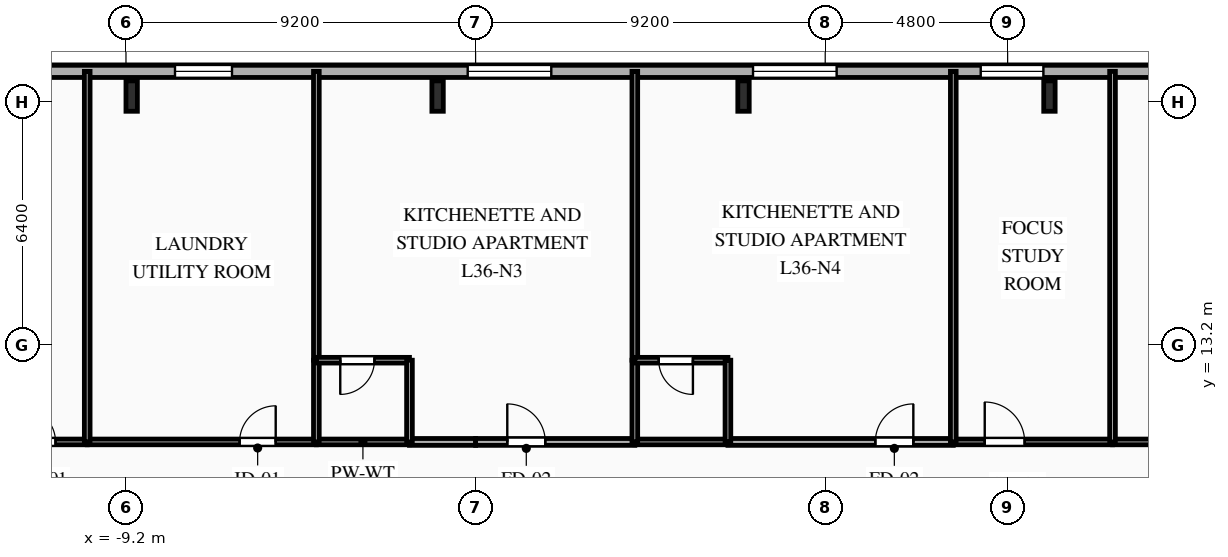
"""IFC4 building model, lengths in metres.
Left out: names, types, materials, properties, quantities, classifications, styles, units other than length and angle.
Written with IfcOpenShell. Run it as: python <this file> out.ifc"""

import sys

from ifc_helpers import new_model, si_unit, direction, frame, frame_2d, origin, origin_2d, place, context, subcontext, project, spatial, rectangle, i_section, extrude, element, fill, save


model = new_model("IFC4")
c1 = context("Model", 3, precision=1e-05, world=origin(), true_north=direction((0.0, 1.0)))
c2 = subcontext(c1, "Body", "Model", "MODEL_VIEW")
j1 = project(units=[si_unit("LENGTHUNIT", "METRE"), si_unit("PLANEANGLEUNIT", "RADIAN")], contexts=[c1])
p1 = place(None, origin())
s1 = spatial("IfcSite", under=j1, at=p1, CompositionType="ELEMENT")
p2 = place(p1, origin())
s2 = spatial("IfcBuilding", under=s1, at=p2, CompositionType="ELEMENT")
p3 = place(p2, frame((0.0, 0.0, 131.0)))
s3 = spatial("IfcBuildingStorey", under=s2, at=p3, CompositionType="ELEMENT", Elevation=131.0)
for number, where, z_axis, x_axis in (
    (1, (15.1, 19.75, 0.0), (0.0, 0.0, 1.0), (1.0, 0.0, 0.0)),
    (2, (7.05, 19.75, 0.0), (0.0, 0.0, 1.0), (1.0, 0.0, 0.0)),
    (3, (-1.0, 19.75, 0.0), (0.0, 0.0, 1.0), (1.0, 0.0, 0.0)),
    (4, (-9.05, 19.75, 0.0), (0.0, 0.0, 1.0), (1.0, 0.0, 0.0)),
):
    element("IfcColumn", number, at=place(p3, frame(where, z_axis=z_axis, x_axis=x_axis)), inside=s3, PredefinedType="COLUMN", context=c2, shape_type="SweptSolid", body=[
        extrude(i_section(OverallWidth=0.3, OverallDepth=0.8, WebThickness=0.018, FlangeThickness=0.033, FilletRadius=0.03, at=origin_2d()), origin(), (0.0, 0.0, 1.0), 3.35),
    ])
p4 = place(p3, frame((-25.8, 20.4, 0.0), z_axis=(0.0, 0.0, 1.0), x_axis=(1.0, 0.0, 0.0)))
e5 = element("IfcWall", 5, at=p4, inside=s3, PredefinedType="SOLIDWALL", context=c2, shape_type="SweptSolid", body=[
    extrude(rectangle(XDim=49.6, YDim=0.32, at=frame_2d((24.8, 0.0))), origin(), (0.0, 0.0, 1.0), 3.04),
])
p5 = place(p4, frame((47.4, 0.0, 0.0)))
e6 = element("IfcOpeningElement", 6, at=p5, cuts=e5, PredefinedType="OPENING", context=c2, shape_type="SweptSolid", body=[
    extrude(rectangle(XDim=1.2, YDim=2.2, at=frame_2d((0.6, 1.1))), frame((0.0, 0.17, 0.0), z_axis=(0.0, -1.0, 0.0), x_axis=(1.0, 0.0, 0.0)), (0.0, 0.0, 1.0), 0.34),
])
p6 = place(p4, frame((2.135, 0.0, 0.85)))
e7 = element("IfcOpeningElement", 7, at=p6, cuts=e5, PredefinedType="OPENING", context=c2, shape_type="SweptSolid", body=[
    extrude(rectangle(XDim=1.65, YDim=1.85, at=frame_2d((0.825, 0.925))), frame((0.0, 0.17, 0.0), z_axis=(0.0, -1.0, 0.0), x_axis=(1.0, 0.0, 0.0)), (0.0, 0.0, 1.0), 0.34),
])
p7 = place(p4, frame((6.135, 0.0, 0.85)))
e8 = element("IfcOpeningElement", 8, at=p7, cuts=e5, PredefinedType="OPENING", context=c2, shape_type="SweptSolid", body=[
    extrude(rectangle(XDim=1.65, YDim=1.85, at=frame_2d((0.825, 0.925))), frame((0.0, 0.17, 0.0), z_axis=(0.0, -1.0, 0.0), x_axis=(1.0, 0.0, 0.0)), (0.0, 0.0, 1.0), 0.34),
])
p8 = place(p4, frame((10.375, 0.0, 0.85)))
e9 = element("IfcOpeningElement", 9, at=p8, cuts=e5, PredefinedType="OPENING", context=c2, shape_type="SweptSolid", body=[
    extrude(rectangle(XDim=1.65, YDim=1.85, at=frame_2d((0.825, 0.925))), frame((0.0, 0.17, 0.0), z_axis=(0.0, -1.0, 0.0), x_axis=(1.0, 0.0, 0.0)), (0.0, 0.0, 1.0), 0.34),
])
p9 = place(p4, frame((17.89, 0.0, 0.85)))
e10 = element("IfcOpeningElement", 10, at=p9, cuts=e5, PredefinedType="OPENING", context=c2, shape_type="SweptSolid", body=[
    extrude(rectangle(XDim=1.5, YDim=1.85, at=frame_2d((0.75, 0.925))), frame((0.0, 0.17, 0.0), z_axis=(0.0, -1.0, 0.0), x_axis=(1.0, 0.0, 0.0)), (0.0, 0.0, 1.0), 0.34),
])
p10 = place(p4, frame((25.592, 0.0, 0.85)))
e11 = element("IfcOpeningElement", 11, at=p10, cuts=e5, PredefinedType="OPENING", context=c2, shape_type="SweptSolid", body=[
    extrude(rectangle(XDim=2.2, YDim=1.85, at=frame_2d((1.1, 0.925))), frame((0.0, 0.17, 0.0), z_axis=(0.0, -1.0, 0.0), x_axis=(1.0, 0.0, 0.0)), (0.0, 0.0, 1.0), 0.34),
])
p11 = place(p4, frame((33.1, 0.0, 0.85)))
e12 = element("IfcOpeningElement", 12, at=p11, cuts=e5, PredefinedType="OPENING", context=c2, shape_type="SweptSolid", body=[
    extrude(rectangle(XDim=2.2, YDim=1.85, at=frame_2d((1.1, 0.925))), frame((0.0, 0.17, 0.0), z_axis=(0.0, -1.0, 0.0), x_axis=(1.0, 0.0, 0.0)), (0.0, 0.0, 1.0), 0.34),
])
p12 = place(p4, frame((39.092, 0.0, 0.85)))
e13 = element("IfcOpeningElement", 13, at=p12, cuts=e5, PredefinedType="OPENING", context=c2, shape_type="SweptSolid", body=[
    extrude(rectangle(XDim=1.65, YDim=1.85, at=frame_2d((0.825, 0.925))), frame((0.0, 0.17, 0.0), z_axis=(0.0, -1.0, 0.0), x_axis=(1.0, 0.0, 0.0)), (0.0, 0.0, 1.0), 0.34),
])
p13 = place(p4, frame((43.855, 0.0, 0.85)))
e14 = element("IfcOpeningElement", 14, at=p13, cuts=e5, PredefinedType="OPENING", context=c2, shape_type="SweptSolid", body=[
    extrude(rectangle(XDim=1.65, YDim=1.85, at=frame_2d((0.825, 0.925))), frame((0.0, 0.17, 0.0), z_axis=(0.0, -1.0, 0.0), x_axis=(1.0, 0.0, 0.0)), (0.0, 0.0, 1.0), 0.34),
])
p14 = place(p3, frame((-12.57, 10.65, 0.0), z_axis=(0.0, 0.0, 1.0), x_axis=(1.0, 0.0, 0.0)))
e15 = element("IfcWall", 15, at=p14, inside=s3, PredefinedType="PLUMBINGWALL", context=c2, shape_type="SweptSolid", body=[
    extrude(rectangle(XDim=2.35, YDim=0.15, at=frame_2d((1.175, 0.0))), origin(), (0.0, 0.0, 1.0), 3.04),
])
p15 = place(p14, frame((0.616, 0.0, 0.0)))
e16 = element("IfcOpeningElement", 16, at=p15, cuts=e15, PredefinedType="OPENING", context=c2, shape_type="SweptSolid", body=[
    extrude(rectangle(XDim=0.9, YDim=2.1, at=frame_2d((0.45, 1.05))), frame((0.0, 0.085, 0.0), z_axis=(0.0, -1.0, 0.0), x_axis=(1.0, 0.0, 0.0)), (0.0, 0.0, 1.0), 0.17),
])
p16 = place(p3, frame((-10.22, 10.65, 0.0), z_axis=(0.0, 0.0, 1.0), x_axis=(1.0, 0.0, 0.0)))
e17 = element("IfcWall", 17, at=p16, inside=s3, PredefinedType="PARTITIONING", context=c2, shape_type="SweptSolid", body=[
    extrude(rectangle(XDim=6.03, YDim=0.15, at=frame_2d((3.015, 0.0))), origin(), (0.0, 0.0, 1.0), 3.04),
])
p17 = place(p16, frame((4.01, 0.0, 0.0)))
e18 = element("IfcOpeningElement", 18, at=p17, cuts=e17, PredefinedType="OPENING", context=c2, shape_type="SweptSolid", body=[
    extrude(rectangle(XDim=0.95, YDim=2.1, at=frame_2d((0.475, 1.05))), frame((0.0, 0.085, 0.0), z_axis=(0.0, -1.0, 0.0), x_axis=(1.0, 0.0, 0.0)), (0.0, 0.0, 1.0), 0.17),
])
p18 = place(p3, frame((-1.74, 10.65, 0.0), z_axis=(0.0, 0.0, 1.0), x_axis=(1.0, 0.0, 0.0)))
e19 = element("IfcWall", 19, at=p18, inside=s3, PredefinedType="PARTITIONING", context=c2, shape_type="SweptSolid", body=[
    extrude(rectangle(XDim=1.74, YDim=0.18, at=frame_2d((0.87, 0.0))), origin(), (0.0, 0.0, 1.0), 3.04),
])
p19 = place(p3, frame((-4.19, 10.65, 0.0), z_axis=(0.0, 0.0, 1.0), x_axis=(1.0, 0.0, 0.0)))
e20 = element("IfcWall", 20, at=p19, inside=s3, PredefinedType="PLUMBINGWALL", context=c2, shape_type="SweptSolid", body=[
    extrude(rectangle(XDim=2.45, YDim=0.15, at=frame_2d((1.225, 0.0))), origin(), (0.0, 0.0, 1.0), 3.04),
])
p20 = place(p3, frame((0.0, 10.65, 0.0), z_axis=(0.0, 0.0, 1.0), x_axis=(1.0, 0.0, 0.0)))
e21 = element("IfcWall", 21, at=p20, inside=s3, PredefinedType="PARTITIONING", context=c2, shape_type="SweptSolid", body=[
    extrude(rectangle(XDim=4.19, YDim=0.18, at=frame_2d((2.095, 0.0))), origin(), (0.0, 0.0, 1.0), 3.04),
])
p21 = place(p20, frame((0.834, 0.0, 0.0)))
e22 = element("IfcOpeningElement", 22, at=p21, cuts=e21, PredefinedType="OPENING", context=c2, shape_type="SweptSolid", body=[
    extrude(rectangle(XDim=1.0, YDim=2.15, at=frame_2d((0.5, 1.075))), frame((0.0, 0.1, 0.0), z_axis=(0.0, -1.0, 0.0), x_axis=(1.0, 0.0, 0.0)), (0.0, 0.0, 1.0), 0.2),
])
p22 = place(p3, frame((6.64, 10.65, 0.0), z_axis=(0.0, 0.0, 1.0), x_axis=(1.0, 0.0, 0.0)))
e23 = element("IfcWall", 23, at=p22, inside=s3, PredefinedType="PARTITIONING", context=c2, shape_type="SweptSolid", body=[
    extrude(rectangle(XDim=5.93, YDim=0.18, at=frame_2d((2.965, 0.0))), origin(), (0.0, 0.0, 1.0), 3.04),
])
p23 = place(p22, frame((3.879, 0.0, 0.0)))
e24 = element("IfcOpeningElement", 24, at=p23, cuts=e23, PredefinedType="OPENING", context=c2, shape_type="SweptSolid", body=[
    extrude(rectangle(XDim=1.0, YDim=2.15, at=frame_2d((0.5, 1.075))), frame((0.0, 0.1, 0.0), z_axis=(0.0, -1.0, 0.0), x_axis=(1.0, 0.0, 0.0)), (0.0, 0.0, 1.0), 0.2),
])
p24 = place(p3, frame((4.19, 10.65, 0.0), z_axis=(0.0, 0.0, 1.0), x_axis=(1.0, 0.0, 0.0)))
e25 = element("IfcWall", 25, at=p24, inside=s3, PredefinedType="PLUMBINGWALL", context=c2, shape_type="SweptSolid", body=[
    extrude(rectangle(XDim=2.45, YDim=0.15, at=frame_2d((1.225, 0.0))), origin(), (0.0, 0.0, 1.0), 3.04),
])
p25 = place(p3, frame((12.57, 10.65, 0.0), z_axis=(0.0, 0.0, 1.0), x_axis=(1.0, 0.0, 0.0)))
e26 = element("IfcWall", 26, at=p25, inside=s3, PredefinedType="PARTITIONING", context=c2, shape_type="SweptSolid", body=[
    extrude(rectangle(XDim=4.19, YDim=0.15, at=frame_2d((2.095, 0.0))), origin(), (0.0, 0.0, 1.0), 3.04),
])
p26 = place(p25, frame((0.827, 0.0, 0.0)))
e27 = element("IfcOpeningElement", 27, at=p26, cuts=e26, PredefinedType="OPENING", context=c2, shape_type="SweptSolid", body=[
    extrude(rectangle(XDim=1.05, YDim=2.15, at=frame_2d((0.525, 1.075))), frame((0.0, 0.085, 0.0), z_axis=(0.0, -1.0, 0.0), x_axis=(1.0, 0.0, 0.0)), (0.0, 0.0, 1.0), 0.17),
])
p27 = place(p3, frame((16.76, 10.65, 0.0), z_axis=(0.0, 0.0, 1.0), x_axis=(1.0, 0.0, 0.0)))
e28 = element("IfcWall", 28, at=p27, inside=s3, PredefinedType="PARTITIONING", context=c2, shape_type="SweptSolid", body=[
    extrude(rectangle(XDim=4.19, YDim=0.15, at=frame_2d((2.095, 0.0))), origin(), (0.0, 0.0, 1.0), 3.04),
])
p28 = place(p27, frame((2.312, 0.0, 0.0)))
e29 = element("IfcOpeningElement", 29, at=p28, cuts=e28, PredefinedType="OPENING", context=c2, shape_type="SweptSolid", body=[
    extrude(rectangle(XDim=1.05, YDim=2.15, at=frame_2d((0.525, 1.075))), frame((0.0, 0.085, 0.0), z_axis=(0.0, -1.0, 0.0), x_axis=(1.0, 0.0, 0.0)), (0.0, 0.0, 1.0), 0.17),
])
p29 = place(p3, frame((-10.22, 20.4, 0.0), z_axis=(0.0, 0.0, 1.0), x_axis=(0.0, -1.0, 0.0)))
e30 = element("IfcWall", 30, at=p29, inside=s3, PredefinedType="PLUMBINGWALL", context=c2, shape_type="SweptSolid", body=[
    extrude(rectangle(XDim=9.75, YDim=0.15, at=frame_2d((4.875, 0.0))), origin(), (0.0, 0.0, 1.0), 3.04),
])
p30 = place(p3, frame((-4.19, 20.4, 0.0), z_axis=(0.0, 0.0, 1.0), x_axis=(0.0, -1.0, 0.0)))
e31 = element("IfcWall", 31, at=p30, inside=s3, PredefinedType="PARTITIONING", context=c2, shape_type="SweptSolid", body=[
    extrude(rectangle(XDim=7.6, YDim=0.15, at=frame_2d((3.8, 0.0))), origin(), (0.0, 0.0, 1.0), 3.04),
])
p31 = place(p3, frame((-4.19, 12.8, 0.0), z_axis=(0.0, 0.0, 1.0), x_axis=(0.0, -1.0, 0.0)))
e32 = element("IfcWall", 32, at=p31, inside=s3, PredefinedType="PLUMBINGWALL", context=c2, shape_type="SweptSolid", body=[
    extrude(rectangle(XDim=2.15, YDim=0.15, at=frame_2d((1.075, 0.0))), origin(), (0.0, 0.0, 1.0), 3.04),
])
p32 = place(p3, frame((-1.74, 12.8, 0.0), z_axis=(0.0, 0.0, 1.0), x_axis=(-1.0, 0.0, 0.0)))
e33 = element("IfcWall", 33, at=p32, inside=s3, PredefinedType="PLUMBINGWALL", context=c2, shape_type="SweptSolid", body=[
    extrude(rectangle(XDim=2.45, YDim=0.15, at=frame_2d((1.225, 0.0))), origin(), (0.0, 0.0, 1.0), 3.04),
])
p33 = place(p32, frame((0.921, 0.0, 0.0)))
e34 = element("IfcOpeningElement", 34, at=p33, cuts=e33, PredefinedType="OPENING", context=c2, shape_type="SweptSolid", body=[
    extrude(rectangle(XDim=0.9, YDim=2.1, at=frame_2d((0.45, 1.05))), frame((0.0, 0.085, 0.0), z_axis=(0.0, -1.0, 0.0), x_axis=(1.0, 0.0, 0.0)), (0.0, 0.0, 1.0), 0.17),
])
p34 = place(p3, frame((-1.74, 10.65, 0.0), z_axis=(0.0, 0.0, 1.0), x_axis=(0.0, 1.0, 0.0)))
e35 = element("IfcWall", 35, at=p34, inside=s3, PredefinedType="PLUMBINGWALL", context=c2, shape_type="SweptSolid", body=[
    extrude(rectangle(XDim=2.15, YDim=0.15, at=frame_2d((1.075, 0.0))), origin(), (0.0, 0.0, 1.0), 3.04),
])
p35 = place(p3, frame((4.19, 20.4, 0.0), z_axis=(0.0, 0.0, 1.0), x_axis=(0.0, -1.0, 0.0)))
e36 = element("IfcWall", 36, at=p35, inside=s3, PredefinedType="PARTITIONING", context=c2, shape_type="SweptSolid", body=[
    extrude(rectangle(XDim=7.6, YDim=0.15, at=frame_2d((3.8, 0.0))), origin(), (0.0, 0.0, 1.0), 3.04),
])
p36 = place(p3, frame((4.19, 12.8, 0.0), z_axis=(0.0, 0.0, 1.0), x_axis=(0.0, -1.0, 0.0)))
e37 = element("IfcWall", 37, at=p36, inside=s3, PredefinedType="PLUMBINGWALL", context=c2, shape_type="SweptSolid", body=[
    extrude(rectangle(XDim=2.15, YDim=0.15, at=frame_2d((1.075, 0.0))), origin(), (0.0, 0.0, 1.0), 3.04),
])
p37 = place(p3, frame((6.64, 12.8, 0.0), z_axis=(0.0, 0.0, 1.0), x_axis=(-1.0, 0.0, 0.0)))
e38 = element("IfcWall", 38, at=p37, inside=s3, PredefinedType="PLUMBINGWALL", context=c2, shape_type="SweptSolid", body=[
    extrude(rectangle(XDim=2.45, YDim=0.15, at=frame_2d((1.225, 0.0))), origin(), (0.0, 0.0, 1.0), 3.04),
])
p38 = place(p37, frame((0.921, 0.0, 0.0)))
e39 = element("IfcOpeningElement", 39, at=p38, cuts=e38, PredefinedType="OPENING", context=c2, shape_type="SweptSolid", body=[
    extrude(rectangle(XDim=0.9, YDim=2.1, at=frame_2d((0.45, 1.05))), frame((0.0, 0.085, 0.0), z_axis=(0.0, -1.0, 0.0), x_axis=(1.0, 0.0, 0.0)), (0.0, 0.0, 1.0), 0.17),
])
p39 = place(p3, frame((6.64, 10.65, 0.0), z_axis=(0.0, 0.0, 1.0), x_axis=(0.0, 1.0, 0.0)))
e40 = element("IfcWall", 40, at=p39, inside=s3, PredefinedType="PLUMBINGWALL", context=c2, shape_type="SweptSolid", body=[
    extrude(rectangle(XDim=2.15, YDim=0.15, at=frame_2d((1.075, 0.0))), origin(), (0.0, 0.0, 1.0), 3.04),
])
p40 = place(p3, frame((12.57, 20.4, 0.0), z_axis=(0.0, 0.0, 1.0), x_axis=(0.0, -1.0, 0.0)))
e41 = element("IfcWall", 41, at=p40, inside=s3, PredefinedType="PARTITIONING", context=c2, shape_type="SweptSolid", body=[
    extrude(rectangle(XDim=9.75, YDim=0.15, at=frame_2d((4.875, 0.0))), origin(), (0.0, 0.0, 1.0), 3.04),
])
p41 = place(p3, frame((16.76, 20.4, 0.0), z_axis=(0.0, 0.0, 1.0), x_axis=(0.0, -1.0, 0.0)))
e42 = element("IfcWall", 42, at=p41, inside=s3, PredefinedType="PARTITIONING", context=c2, shape_type="SweptSolid", body=[
    extrude(rectangle(XDim=9.75, YDim=0.15, at=frame_2d((4.875, 0.0))), origin(), (0.0, 0.0, 1.0), 2.525),
])
p42 = place(p9, origin())
e43 = element("IfcWindow", 43, at=p42, inside=s3, PartitioningType="SINGLE_PANEL", PredefinedType="WINDOW", context=c2, shape_type="SweptSolid", body=[
    extrude(rectangle(XDim=1.5, YDim=1.85, at=frame_2d((0.75, 0.925))), frame((0.0, 0.03, 0.0), z_axis=(0.0, -1.0, 0.0), x_axis=(1.0, 0.0, 0.0)), (0.0, 0.0, 1.0), 0.06),
])
fill(e10, e43)
p43 = place(p10, origin())
e44 = element("IfcWindow", 44, at=p43, inside=s3, PartitioningType="SINGLE_PANEL", PredefinedType="WINDOW", context=c2, shape_type="SweptSolid", body=[
    extrude(rectangle(XDim=2.2, YDim=1.85, at=frame_2d((1.1, 0.925))), frame((0.0, 0.03, 0.0), z_axis=(0.0, -1.0, 0.0), x_axis=(1.0, 0.0, 0.0)), (0.0, 0.0, 1.0), 0.06),
])
fill(e11, e44)
p44 = place(p11, origin())
e45 = element("IfcWindow", 45, at=p44, inside=s3, PartitioningType="SINGLE_PANEL", PredefinedType="WINDOW", context=c2, shape_type="SweptSolid", body=[
    extrude(rectangle(XDim=2.2, YDim=1.85, at=frame_2d((1.1, 0.925))), frame((0.0, 0.03, 0.0), z_axis=(0.0, -1.0, 0.0), x_axis=(1.0, 0.0, 0.0)), (0.0, 0.0, 1.0), 0.06),
])
fill(e12, e45)
p45 = place(p12, origin())
e46 = element("IfcWindow", 46, at=p45, inside=s3, PartitioningType="SINGLE_PANEL", PredefinedType="WINDOW", context=c2, shape_type="SweptSolid", body=[
    extrude(rectangle(XDim=1.65, YDim=1.85, at=frame_2d((0.825, 0.925))), frame((0.0, 0.03, 0.0), z_axis=(0.0, -1.0, 0.0), x_axis=(1.0, 0.0, 0.0)), (0.0, 0.0, 1.0), 0.06),
])
fill(e13, e46)
p46 = place(p15, origin())
e47 = element("IfcDoor", 47, at=p46, inside=s3, OperationType="SINGLE_SWING_LEFT", PredefinedType="DOOR", context=c2, shape_type="SweptSolid", body=[
    extrude(rectangle(XDim=0.9, YDim=2.1, at=frame_2d((0.45, 1.05))), frame((0.0, 0.025, 0.0), z_axis=(0.0, -1.0, 0.0), x_axis=(1.0, 0.0, 0.0)), (0.0, 0.0, 1.0), 0.05),
])
fill(e16, e47)
p47 = place(p17, origin())
e48 = element("IfcDoor", 48, at=p47, inside=s3, OperationType="SINGLE_SWING_RIGHT", PredefinedType="DOOR", context=c2, shape_type="SweptSolid", body=[
    extrude(rectangle(XDim=0.95, YDim=2.1, at=frame_2d((0.475, 1.05))), frame((0.0, 0.025, 0.0), z_axis=(0.0, -1.0, 0.0), x_axis=(1.0, 0.0, 0.0)), (0.0, 0.0, 1.0), 0.05),
])
fill(e18, e48)
p48 = place(p21, origin())
e49 = element("IfcDoor", 49, at=p48, inside=s3, OperationType="SINGLE_SWING_LEFT", PredefinedType="DOOR", context=c2, shape_type="SweptSolid", body=[
    extrude(rectangle(XDim=1.0, YDim=2.15, at=frame_2d((0.5, 1.075))), frame((0.0, 0.025, 0.0), z_axis=(0.0, -1.0, 0.0), x_axis=(1.0, 0.0, 0.0)), (0.0, 0.0, 1.0), 0.05),
])
fill(e22, e49)
p49 = place(p23, origin())
e50 = element("IfcDoor", 50, at=p49, inside=s3, OperationType="SINGLE_SWING_RIGHT", PredefinedType="DOOR", context=c2, shape_type="SweptSolid", body=[
    extrude(rectangle(XDim=1.0, YDim=2.15, at=frame_2d((0.5, 1.075))), frame((0.0, 0.025, 0.0), z_axis=(0.0, -1.0, 0.0), x_axis=(1.0, 0.0, 0.0)), (0.0, 0.0, 1.0), 0.05),
])
fill(e24, e50)
p50 = place(p26, origin())
e51 = element("IfcDoor", 51, at=p50, inside=s3, OperationType="SINGLE_SWING_LEFT", PredefinedType="DOOR", context=c2, shape_type="SweptSolid", body=[
    extrude(rectangle(XDim=1.05, YDim=2.15, at=frame_2d((0.525, 1.075))), frame((0.0, 0.025, 0.0), z_axis=(0.0, -1.0, 0.0), x_axis=(1.0, 0.0, 0.0)), (0.0, 0.0, 1.0), 0.05),
])
fill(e27, e51)
p51 = place(p33, origin())
e52 = element("IfcDoor", 52, at=p51, inside=s3, OperationType="SINGLE_SWING_RIGHT", PredefinedType="DOOR", context=c2, shape_type="SweptSolid", body=[
    extrude(rectangle(XDim=0.9, YDim=2.1, at=frame_2d((0.45, 1.05))), frame((0.0, 0.025, 0.0), z_axis=(0.0, -1.0, 0.0), x_axis=(1.0, 0.0, 0.0)), (0.0, 0.0, 1.0), 0.05),
])
fill(e34, e52)
p52 = place(p38, origin())
e53 = element("IfcDoor", 53, at=p52, inside=s3, OperationType="SINGLE_SWING_LEFT", PredefinedType="DOOR", context=c2, shape_type="SweptSolid", body=[
    extrude(rectangle(XDim=0.9, YDim=2.1, at=frame_2d((0.45, 1.05))), frame((0.0, 0.025, 0.0), z_axis=(0.0, -1.0, 0.0), x_axis=(1.0, 0.0, 0.0)), (0.0, 0.0, 1.0), 0.05),
])
fill(e39, e53)
save(model, sys.argv[1])
